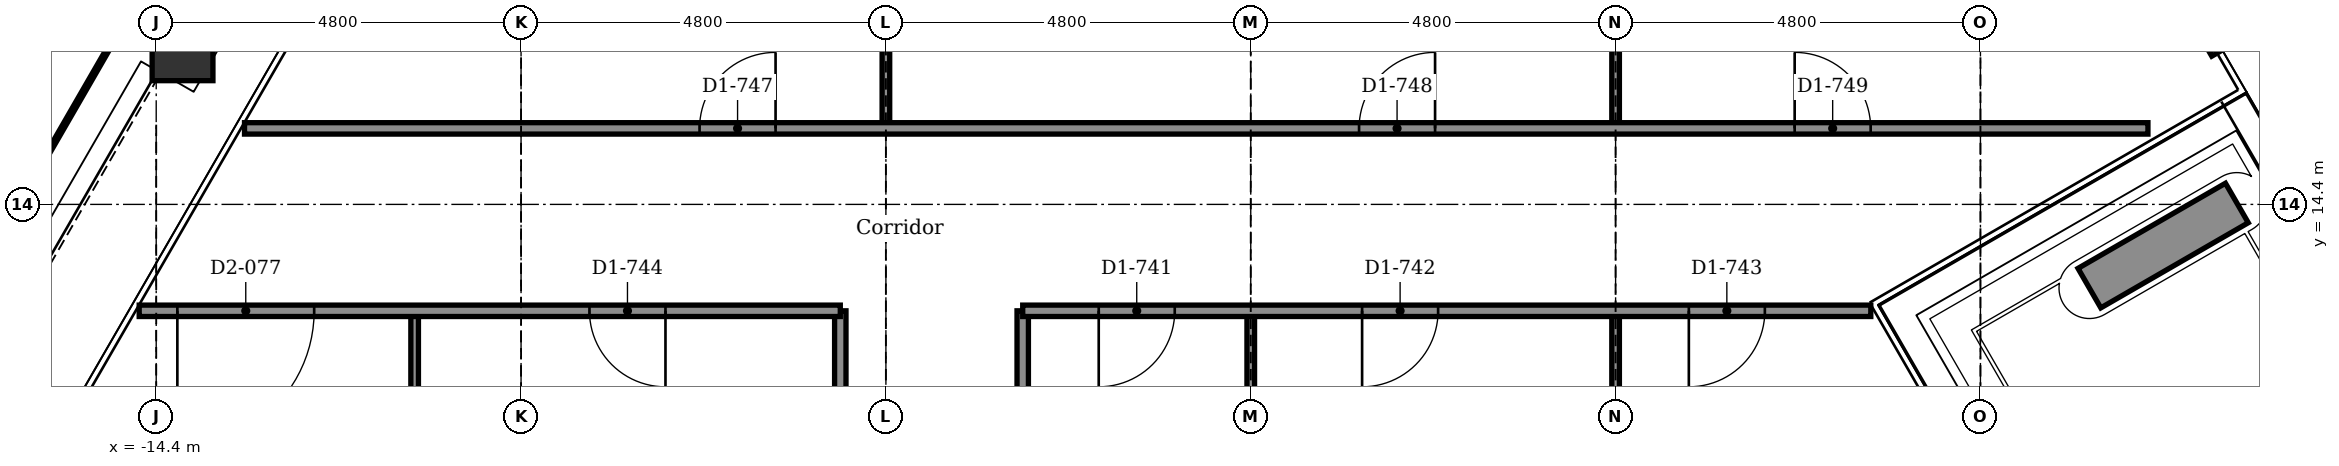
"""IFC4 building model, lengths in metres.
Left out: names, types, materials, properties, quantities, classifications, styles, units other than length and angle.
Written with IfcOpenShell. Run it as: python <this file> out.ifc"""

import sys

from ifc_helpers import new_model, si_unit, direction, frame, frame_2d, origin, origin_2d, place, context, subcontext, project, spatial, rectangle, extrude, element, fill, save


model = new_model("IFC4")
c1 = context("Model", 3, precision=1e-05, world=origin(), true_north=direction((0.0, 1.0)))
c2 = subcontext(c1, "Body", "Model", "MODEL_VIEW")
j1 = project(units=[si_unit("LENGTHUNIT", "METRE"), si_unit("PLANEANGLEUNIT", "RADIAN")], contexts=[c1])
p1 = place(None, origin())
s1 = spatial("IfcSite", under=j1, at=p1, CompositionType="ELEMENT")
p2 = place(p1, origin())
s2 = spatial("IfcBuilding", under=s1, at=p2, CompositionType="ELEMENT")
p3 = place(p2, frame((0.0, 0.0, 285.2)))
s3 = spatial("IfcBuildingStorey", under=s2, at=p3, CompositionType="ELEMENT", Elevation=285.2)
p4 = place(p3, frame((-14.054, 16.428, -0.15), z_axis=(0.0, 0.0, 1.0), x_axis=(0.5, 0.866025403784, 0.0)))
e1 = element("IfcColumn", 1, at=p4, inside=s3, PredefinedType="COLUMN", context=c2, shape_type="SweptSolid", body=[
    extrude(rectangle(XDim=0.8, YDim=0.8, at=origin_2d()), origin(), (0.0, 0.0, 1.0), 3.9),
])
p5 = place(p3, frame((11.513, 18.469, 0.0), z_axis=(0.0, 0.0, 1.0), x_axis=(0.499957262057, -0.866050077142, 0.0)))
e2 = element("IfcWall", 2, at=p5, inside=s3, PredefinedType="PARTITIONING", context=c2, shape_type="SweptSolid", body=[
    extrude(rectangle(XDim=2.4, YDim=0.16, at=frame_2d((1.2, 0.0))), origin(), (0.0, 0.0, 1.0), 3.75),
])
p6 = place(p5, frame((0.45, 0.0, 0.0)))
e3 = element("IfcOpeningElement", 3, at=p6, cuts=e2, PredefinedType="OPENING", context=c2, shape_type="SweptSolid", body=[
    extrude(rectangle(XDim=1.5, YDim=2.4, at=frame_2d((0.75, 1.2))), frame((0.0, 0.09, 0.0), z_axis=(0.0, -1.0, 0.0), x_axis=(1.0, 0.0, 0.0)), (0.0, 0.0, 1.0), 0.18),
])
p7 = place(p3, frame((11.034, 13.298, 0.0), z_axis=(0.0, 0.0, 1.0), x_axis=(0.865980463445, 0.500077830873, 0.0)))
e4 = element("IfcWall", 4, at=p7, inside=s3, PredefinedType="USERDEFINED", context=c2, shape_type="SweptSolid", body=[
    extrude(rectangle(XDim=2.24, YDim=0.6, at=frame_2d((1.12, 0.0))), origin(), (0.0, 0.0, 1.0), 0.7),
])
p8 = place(p3, frame((4.8, 9.875, 0.0), z_axis=(0.0, 0.0, 1.0), x_axis=(0.0, 1.0, 0.0)))
e5 = element("IfcWall", 5, at=p8, inside=s3, PredefinedType="PARTITIONING", context=c2, shape_type="SweptSolid", body=[
    extrude(rectangle(XDim=3.125, YDim=0.1, at=frame_2d((1.562, 0.0))), origin(), (0.0, 0.0, 1.0), 3.217),
])
p9 = place(p3, frame((4.8, 15.4, 0.0), z_axis=(0.0, 0.0, 1.0), x_axis=(0.0, 1.0, 0.0)))
e6 = element("IfcWall", 6, at=p9, inside=s3, PredefinedType="PARTITIONING", context=c2, shape_type="SweptSolid", body=[
    extrude(rectangle(XDim=3.715, YDim=0.1, at=frame_2d((1.857, 0.0))), origin(), (0.0, 0.0, 1.0), 3.217),
])
p10 = place(p3, frame((0.0, 9.875, 0.0), z_axis=(0.0, 0.0, 1.0), x_axis=(0.0, 1.0, 0.0)))
e7 = element("IfcWall", 7, at=p10, inside=s3, PredefinedType="PARTITIONING", context=c2, shape_type="SweptSolid", body=[
    extrude(rectangle(XDim=3.125, YDim=0.1, at=frame_2d((1.562, 0.0))), origin(), (0.0, 0.0, 1.0), 3.217),
])
p11 = place(p3, frame((-3.0, 9.875, 0.0), z_axis=(0.0, 0.0, 1.0), x_axis=(0.0, 1.0, 0.0)))
e8 = element("IfcWall", 8, at=p11, inside=s3, PredefinedType="PARTITIONING", context=c2, shape_type="SweptSolid", body=[
    extrude(rectangle(XDim=3.125, YDim=0.15, at=frame_2d((1.562, 0.0))), origin(), (0.0, 0.0, 1.0), 3.75),
])
p12 = place(p3, frame((-4.8, 15.4, 0.0), z_axis=(0.0, 0.0, 1.0), x_axis=(0.0, 1.0, 0.0)))
e9 = element("IfcWall", 9, at=p12, inside=s3, PredefinedType="PARTITIONING", context=c2, shape_type="SweptSolid", body=[
    extrude(rectangle(XDim=3.715, YDim=0.1, at=frame_2d((1.857, 0.0))), origin(), (0.0, 0.0, 1.0), 3.217),
])
p13 = place(p3, frame((-5.4, 10.15, 0.0), z_axis=(0.0, 0.0, 1.0), x_axis=(0.0, 1.0, 0.0)))
e10 = element("IfcWall", 10, at=p13, inside=s3, PredefinedType="PARTITIONING", context=c2, shape_type="SweptSolid", body=[
    extrude(rectangle(XDim=2.85, YDim=0.15, at=frame_2d((1.425, 0.0))), origin(), (0.0, 0.0, 1.0), 3.75),
])
p14 = place(p3, frame((-11.0, 10.0, 0.0), z_axis=(0.0, 0.0, 1.0), x_axis=(0.0, 1.0, 0.0)))
e11 = element("IfcWall", 11, at=p14, inside=s3, PredefinedType="PARTITIONING", context=c2, shape_type="SweptSolid", body=[
    extrude(rectangle(XDim=3.0, YDim=0.1, at=frame_2d((1.5, 0.0))), origin(), (0.0, 0.0, 1.0), 3.75),
])
p15 = place(p3, frame((-14.624, 13.0, 0.0), z_axis=(0.0, 0.0, 1.0), x_axis=(1.0, 0.0, 0.0)))
e12 = element("IfcWall", 12, at=p15, inside=s3, PredefinedType="PARTITIONING", context=c2, shape_type="SweptSolid", body=[
    extrude(rectangle(XDim=9.224, YDim=0.15, at=frame_2d((4.612, 0.0))), origin(), (0.0, 0.0, 1.0), 3.75),
])
p16 = place(p15, frame((5.924, 0.0, 0.0)))
e13 = element("IfcOpeningElement", 13, at=p16, cuts=e12, PredefinedType="OPENING", context=c2, shape_type="SweptSolid", body=[
    extrude(rectangle(XDim=1.0, YDim=2.1, at=frame_2d((0.5, 1.05))), frame((0.0, 0.085, 0.0), z_axis=(0.0, -1.0, 0.0), x_axis=(1.0, 0.0, 0.0)), (0.0, 0.0, 1.0), 0.17),
])
p17 = place(p15, frame((0.502, 0.0, 0.0)))
e14 = element("IfcOpeningElement", 14, at=p17, cuts=e12, PredefinedType="OPENING", context=c2, shape_type="SweptSolid", body=[
    extrude(rectangle(XDim=1.8, YDim=2.1, at=frame_2d((0.9, 1.05))), frame((0.0, 0.085, 0.0), z_axis=(0.0, -1.0, 0.0), x_axis=(1.0, 0.0, 0.0)), (0.0, 0.0, 1.0), 0.17),
])
p18 = place(p3, frame((-3.0, 13.0, 0.0), z_axis=(0.0, 0.0, 1.0), x_axis=(1.0, 0.0, 0.0)))
e15 = element("IfcWall", 15, at=p18, inside=s3, PredefinedType="PARTITIONING", context=c2, shape_type="SweptSolid", body=[
    extrude(rectangle(XDim=11.157, YDim=0.15, at=frame_2d((5.579, 0.0))), origin(), (0.0, 0.0, 1.0), 3.75),
])
p19 = place(p18, frame((1.0, 0.0, 0.0)))
e16 = element("IfcOpeningElement", 16, at=p19, cuts=e15, PredefinedType="OPENING", context=c2, shape_type="SweptSolid", body=[
    extrude(rectangle(XDim=1.0, YDim=2.1, at=frame_2d((0.5, 1.05))), frame((0.0, 0.085, 0.0), z_axis=(0.0, -1.0, 0.0), x_axis=(1.0, 0.0, 0.0)), (0.0, 0.0, 1.0), 0.17),
])
p20 = place(p18, frame((4.465, 0.0, 0.0)))
e17 = element("IfcOpeningElement", 17, at=p20, cuts=e15, PredefinedType="OPENING", context=c2, shape_type="SweptSolid", body=[
    extrude(rectangle(XDim=1.0, YDim=2.1, at=frame_2d((0.5, 1.05))), frame((0.0, 0.085, 0.0), z_axis=(0.0, -1.0, 0.0), x_axis=(1.0, 0.0, 0.0)), (0.0, 0.0, 1.0), 0.17),
])
p21 = place(p18, frame((8.764, 0.0, 0.0)))
e18 = element("IfcOpeningElement", 18, at=p21, cuts=e15, PredefinedType="OPENING", context=c2, shape_type="SweptSolid", body=[
    extrude(rectangle(XDim=1.0, YDim=2.1, at=frame_2d((0.5, 1.05))), frame((0.0, 0.085, 0.0), z_axis=(0.0, -1.0, 0.0), x_axis=(1.0, 0.0, 0.0)), (0.0, 0.0, 1.0), 0.17),
])
p22 = place(p3, frame((-13.238, 15.4, 0.0), z_axis=(0.0, 0.0, 1.0), x_axis=(1.0, 0.0, 0.0)))
e19 = element("IfcWall", 19, at=p22, inside=s3, PredefinedType="PARTITIONING", context=c2, shape_type="SweptSolid", body=[
    extrude(rectangle(XDim=25.042, YDim=0.15, at=frame_2d((12.521, 0.0))), origin(), (0.0, 0.0, 1.0), 3.75),
])
p23 = place(p22, frame((5.987, 0.0, 0.0)))
e20 = element("IfcOpeningElement", 20, at=p23, cuts=e19, PredefinedType="OPENING", context=c2, shape_type="SweptSolid", body=[
    extrude(rectangle(XDim=1.0, YDim=2.1, at=frame_2d((0.5, 1.05))), frame((0.0, 0.085, 0.0), z_axis=(0.0, -1.0, 0.0), x_axis=(1.0, 0.0, 0.0)), (0.0, 0.0, 1.0), 0.17),
])
p24 = place(p22, frame((14.663, 0.0, 0.0)))
e21 = element("IfcOpeningElement", 21, at=p24, cuts=e19, PredefinedType="OPENING", context=c2, shape_type="SweptSolid", body=[
    extrude(rectangle(XDim=1.0, YDim=2.1, at=frame_2d((0.5, 1.05))), frame((0.0, 0.085, 0.0), z_axis=(0.0, -1.0, 0.0), x_axis=(1.0, 0.0, 0.0)), (0.0, 0.0, 1.0), 0.17),
])
p25 = place(p22, frame((20.394, 0.0, 0.0)))
e22 = element("IfcOpeningElement", 22, at=p25, cuts=e19, PredefinedType="OPENING", context=c2, shape_type="SweptSolid", body=[
    extrude(rectangle(XDim=1.0, YDim=2.1, at=frame_2d((0.5, 1.05))), frame((0.0, 0.085, 0.0), z_axis=(0.0, -1.0, 0.0), x_axis=(1.0, 0.0, 0.0)), (0.0, 0.0, 1.0), 0.17),
])
p26 = place(p19, frame((1.0, 0.0, 0.0), z_axis=(0.0, 0.0, 1.0), x_axis=(-1.0, 0.0, 0.0)))
e23 = element("IfcDoor", 23, at=p26, inside=s3, OperationType="SINGLE_SWING_LEFT", PredefinedType="DOOR", context=c2, shape_type="SweptSolid", body=[
    extrude(rectangle(XDim=1.0, YDim=2.1, at=frame_2d((0.5, 1.05))), frame((0.0, 0.025, 0.0), z_axis=(0.0, -1.0, 0.0), x_axis=(1.0, 0.0, 0.0)), (0.0, 0.0, 1.0), 0.05),
])
fill(e16, e23)
p27 = place(p20, frame((1.0, 0.0, 0.0), z_axis=(0.0, 0.0, 1.0), x_axis=(-1.0, 0.0, 0.0)))
e24 = element("IfcDoor", 24, at=p27, inside=s3, OperationType="SINGLE_SWING_LEFT", PredefinedType="DOOR", context=c2, shape_type="SweptSolid", body=[
    extrude(rectangle(XDim=1.0, YDim=2.1, at=frame_2d((0.5, 1.05))), frame((0.0, 0.025, 0.0), z_axis=(0.0, -1.0, 0.0), x_axis=(1.0, 0.0, 0.0)), (0.0, 0.0, 1.0), 0.05),
])
fill(e17, e24)
p28 = place(p21, frame((1.0, 0.0, 0.0), z_axis=(0.0, 0.0, 1.0), x_axis=(-1.0, 0.0, 0.0)))
e25 = element("IfcDoor", 25, at=p28, inside=s3, OperationType="SINGLE_SWING_LEFT", PredefinedType="DOOR", context=c2, shape_type="SweptSolid", body=[
    extrude(rectangle(XDim=1.0, YDim=2.1, at=frame_2d((0.5, 1.05))), frame((0.0, 0.025, 0.0), z_axis=(0.0, -1.0, 0.0), x_axis=(1.0, 0.0, 0.0)), (0.0, 0.0, 1.0), 0.05),
])
fill(e18, e25)
p29 = place(p16, frame((1.0, 0.0, 0.0), z_axis=(0.0, 0.0, 1.0), x_axis=(-1.0, 0.0, 0.0)))
e26 = element("IfcDoor", 26, at=p29, inside=s3, OperationType="SINGLE_SWING_RIGHT", PredefinedType="DOOR", context=c2, shape_type="SweptSolid", body=[
    extrude(rectangle(XDim=1.0, YDim=2.1, at=frame_2d((0.5, 1.05))), frame((0.0, 0.025, 0.0), z_axis=(0.0, -1.0, 0.0), x_axis=(1.0, 0.0, 0.0)), (0.0, 0.0, 1.0), 0.05),
])
fill(e13, e26)
p30 = place(p23, origin())
e27 = element("IfcDoor", 27, at=p30, inside=s3, OperationType="SINGLE_SWING_RIGHT", PredefinedType="DOOR", context=c2, shape_type="SweptSolid", body=[
    extrude(rectangle(XDim=1.0, YDim=2.1, at=frame_2d((0.5, 1.05))), frame((0.0, 0.025, 0.0), z_axis=(0.0, -1.0, 0.0), x_axis=(1.0, 0.0, 0.0)), (0.0, 0.0, 1.0), 0.05),
])
fill(e20, e27)
p31 = place(p24, origin())
e28 = element("IfcDoor", 28, at=p31, inside=s3, OperationType="SINGLE_SWING_RIGHT", PredefinedType="DOOR", context=c2, shape_type="SweptSolid", body=[
    extrude(rectangle(XDim=1.0, YDim=2.1, at=frame_2d((0.5, 1.05))), frame((0.0, 0.025, 0.0), z_axis=(0.0, -1.0, 0.0), x_axis=(1.0, 0.0, 0.0)), (0.0, 0.0, 1.0), 0.05),
])
fill(e21, e28)
p32 = place(p25, origin())
e29 = element("IfcDoor", 29, at=p32, inside=s3, OperationType="SINGLE_SWING_LEFT", PredefinedType="DOOR", context=c2, shape_type="SweptSolid", body=[
    extrude(rectangle(XDim=1.0, YDim=2.1, at=frame_2d((0.5, 1.05))), frame((0.0, 0.025, 0.0), z_axis=(0.0, -1.0, 0.0), x_axis=(1.0, 0.0, 0.0)), (0.0, 0.0, 1.0), 0.05),
])
fill(e22, e29)
p33 = place(p17, frame((1.8, 0.0, 0.0), z_axis=(0.0, 0.0, 1.0), x_axis=(-1.0, 0.0, 0.0)))
e30 = element("IfcDoor", 30, at=p33, inside=s3, OperationType="SINGLE_SWING_LEFT", PredefinedType="DOOR", context=c2, shape_type="SweptSolid", body=[
    extrude(rectangle(XDim=1.8, YDim=2.1, at=frame_2d((0.9, 1.05))), frame((0.0, 0.025, 0.0), z_axis=(0.0, -1.0, 0.0), x_axis=(1.0, 0.0, 0.0)), (0.0, 0.0, 1.0), 0.05),
])
fill(e14, e30)
save(model, sys.argv[1])
